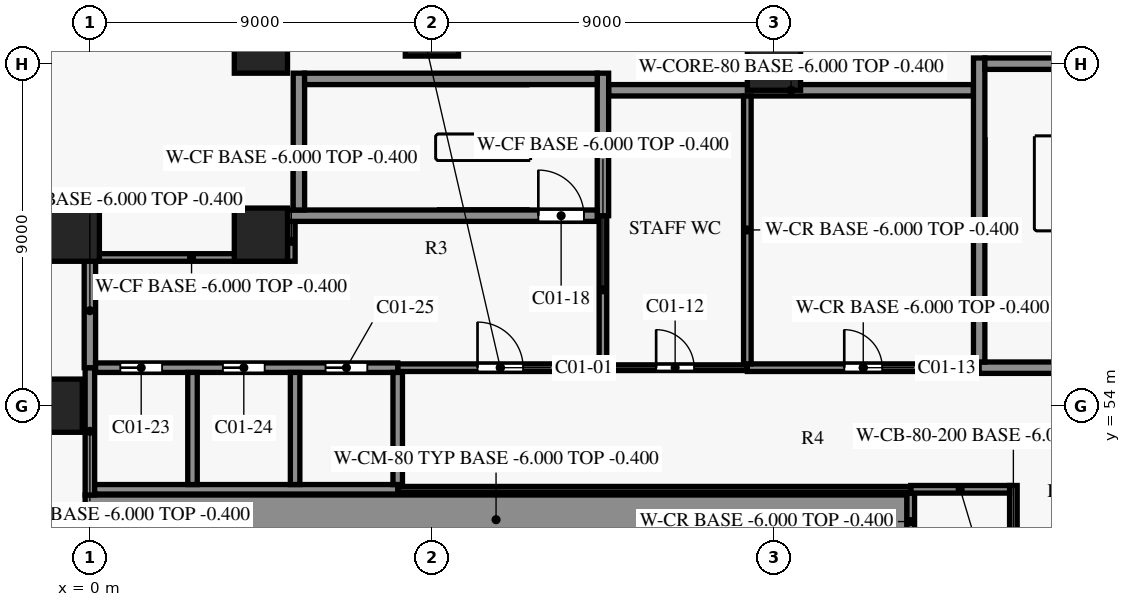
"""IFC4 building model, lengths in metres.
Left out: names, types, materials, properties, quantities, classifications, styles, units other than length and angle.
Written with IfcOpenShell. Run it as: python <this file> out.ifc"""

import sys

from ifc_helpers import new_model, si_unit, direction, frame, frame_2d, origin, origin_2d, place, context, subcontext, project, spatial, rectangle, extrude, element, fill, save


model = new_model("IFC4")
c1 = context("Model", 3, precision=1e-05, world=origin(), true_north=direction((0.0, 1.0)))
c2 = subcontext(c1, "Body", "Model", "MODEL_VIEW")
j1 = project(units=[si_unit("LENGTHUNIT", "METRE"), si_unit("PLANEANGLEUNIT", "RADIAN")], contexts=[c1])
p1 = place(None, origin())
s1 = spatial("IfcSite", under=j1, at=p1, CompositionType="ELEMENT")
p2 = place(p1, origin())
s2 = spatial("IfcBuilding", under=s1, at=p2, CompositionType="ELEMENT")
p3 = place(p2, frame((0.0, 0.0, -6.0)))
s3 = spatial("IfcBuildingStorey", under=s2, at=p3, CompositionType="ELEMENT", Elevation=-6.0)
for number, where, z_axis, x_axis in (
    (1, (18.0, 63.0, 0.0), (0.0, 0.0, 1.0), (1.0, 0.0, 0.0)),
    (2, (9.0, 63.9, 0.0), (0.0, 0.0, 1.0), (1.0, 0.0, 0.0)),
    (3, (4.5, 63.45, 0.0), (0.0, 0.0, 1.0), (1.0, 0.0, 0.0)),
    (4, (-0.45, 58.5, 0.0), (0.0, 0.0, 1.0), (1.0, 0.0, 0.0)),
    (5, (-0.9, 54.0, 0.0), (0.0, 0.0, 1.0), (1.0, 0.0, 0.0)),
    (6, (4.5, 58.5, 0.0), (0.0, 0.0, 1.0), (1.0, 0.0, 0.0)),
):
    element("IfcColumn", number, at=place(p3, frame(where, z_axis=z_axis, x_axis=x_axis)), inside=s3, PredefinedType="COLUMN", context=c2, shape_type="SweptSolid", body=[
        extrude(rectangle(XDim=1.4, YDim=1.4, at=origin_2d()), origin(), (0.0, 0.0, 1.0), 6.0),
    ])
p4 = place(p3, frame((-0.125, 51.0, 0.0), z_axis=(0.0, 0.0, 1.0), x_axis=(1.0, 0.0, 0.0)))
e7 = element("IfcWall", 7, at=p4, inside=s3, PredefinedType="SHEAR", context=c2, shape_type="SweptSolid", body=[
    extrude(rectangle(XDim=21.625, YDim=1.3, at=frame_2d((10.812, 0.0))), origin(), (0.0, 0.0, 1.0), 5.6),
])
p5 = place(p3, frame((8.1, 51.8, 0.0), z_axis=(0.0, 0.0, 1.0), x_axis=(1.0, 0.0, 0.0)))
e8 = element("IfcWall", 8, at=p5, inside=s3, PredefinedType="PARTITIONING", context=c2, shape_type="SweptSolid", body=[
    extrude(rectangle(XDim=13.5, YDim=0.15, at=frame_2d((6.75, 0.0))), origin(), (0.0, 0.0, 1.0), 5.6),
])
p6 = place(p3, frame((21.6, 51.8, 0.0), z_axis=(0.0, 0.0, 1.0), x_axis=(1.0, 0.0, 0.0)))
e9 = element("IfcWall", 9, at=p6, inside=s3, PredefinedType="PARTITIONING", context=c2, shape_type="SweptSolid", body=[
    extrude(rectangle(XDim=2.6, YDim=0.2, at=frame_2d((1.3, 0.0))), origin(), (0.0, 0.0, 1.0), 5.6),
])
p7 = place(p3, frame((0.125, 51.8, 0.0), z_axis=(0.0, 0.0, 1.0), x_axis=(1.0, 0.0, 0.0)))
e10 = element("IfcWall", 10, at=p7, inside=s3, PredefinedType="SHEAR", context=c2, shape_type="SweptSolid", body=[
    extrude(rectangle(XDim=7.975, YDim=0.25, at=frame_2d((3.988, 0.0))), origin(), (0.0, 0.0, 1.0), 5.6),
])
p8 = place(p3, frame((8.1, 55.0, 0.0), z_axis=(0.0, 0.0, 1.0), x_axis=(1.0, 0.0, 0.0)))
e11 = element("IfcWall", 11, at=p8, inside=s3, PredefinedType="PARTITIONING", context=c2, shape_type="SweptSolid", body=[
    extrude(rectangle(XDim=5.4, YDim=0.2, at=frame_2d((2.7, 0.0))), origin(), (0.0, 0.0, 1.0), 5.6),
])
p9 = place(p8, frame((2.1, 0.0, 0.0)))
e12 = element("IfcOpeningElement", 12, at=p9, cuts=e11, PredefinedType="OPENING", context=c2, shape_type="SweptSolid", body=[
    extrude(rectangle(XDim=1.2, YDim=2.2, at=frame_2d((0.6, 1.1))), frame((0.0, 0.11, 0.0), z_axis=(0.0, -1.0, 0.0), x_axis=(1.0, 0.0, 0.0)), (0.0, 0.0, 1.0), 0.22),
])
p10 = place(p3, frame((13.5, 55.0, 0.0), z_axis=(0.0, 0.0, 1.0), x_axis=(1.0, 0.0, 0.0)))
e13 = element("IfcWall", 13, at=p10, inside=s3, PredefinedType="PARTITIONING", context=c2, shape_type="SweptSolid", body=[
    extrude(rectangle(XDim=3.8, YDim=0.15, at=frame_2d((1.9, 0.0))), origin(), (0.0, 0.0, 1.0), 5.6),
])
p11 = place(p10, frame((1.4, 0.0, 0.0)))
e14 = element("IfcOpeningElement", 14, at=p11, cuts=e13, PredefinedType="OPENING", context=c2, shape_type="SweptSolid", body=[
    extrude(rectangle(XDim=1.0, YDim=2.1, at=frame_2d((0.5, 1.05))), frame((0.0, 0.085, 0.0), z_axis=(0.0, -1.0, 0.0), x_axis=(1.0, 0.0, 0.0)), (0.0, 0.0, 1.0), 0.17),
])
p12 = place(p3, frame((17.3, 55.0, 0.0), z_axis=(0.0, 0.0, 1.0), x_axis=(1.0, 0.0, 0.0)))
e15 = element("IfcWall", 15, at=p12, inside=s3, PredefinedType="PARTITIONING", context=c2, shape_type="SweptSolid", body=[
    extrude(rectangle(XDim=6.1, YDim=0.2, at=frame_2d((3.05, 0.0))), origin(), (0.0, 0.0, 1.0), 5.6),
])
p13 = place(p12, frame((2.55, 0.0, 0.0)))
e16 = element("IfcOpeningElement", 16, at=p13, cuts=e15, PredefinedType="OPENING", context=c2, shape_type="SweptSolid", body=[
    extrude(rectangle(XDim=1.0, YDim=2.1, at=frame_2d((0.5, 1.05))), frame((0.0, 0.11, 0.0), z_axis=(0.0, -1.0, 0.0), x_axis=(1.0, 0.0, 0.0)), (0.0, 0.0, 1.0), 0.22),
])
p14 = place(p3, frame((0.15, 55.0, 0.0), z_axis=(0.0, 0.0, 1.0), x_axis=(1.0, 0.0, 0.0)))
e17 = element("IfcWall", 17, at=p14, inside=s3, PredefinedType="SHEAR", context=c2, shape_type="SweptSolid", body=[
    extrude(rectangle(XDim=7.95, YDim=0.25, at=frame_2d((3.975, 0.0))), origin(), (0.0, 0.0, 1.0), 5.6),
])
p15 = place(p14, frame((0.65, 0.0, 0.0)))
e18 = element("IfcOpeningElement", 18, at=p15, cuts=e17, PredefinedType="OPENING", context=c2, shape_type="SweptSolid", body=[
    extrude(rectangle(XDim=1.1, YDim=2.1, at=frame_2d((0.55, 1.05))), frame((0.0, 0.135, 0.0), z_axis=(0.0, -1.0, 0.0), x_axis=(1.0, 0.0, 0.0)), (0.0, 0.0, 1.0), 0.27),
])
p16 = place(p14, frame((3.35, 0.0, 0.0)))
e19 = element("IfcOpeningElement", 19, at=p16, cuts=e17, PredefinedType="OPENING", context=c2, shape_type="SweptSolid", body=[
    extrude(rectangle(XDim=1.1, YDim=2.1, at=frame_2d((0.55, 1.05))), frame((0.0, 0.135, 0.0), z_axis=(0.0, -1.0, 0.0), x_axis=(1.0, 0.0, 0.0)), (0.0, 0.0, 1.0), 0.27),
])
p17 = place(p14, frame((6.05, 0.0, 0.0)))
e20 = element("IfcOpeningElement", 20, at=p17, cuts=e17, PredefinedType="OPENING", context=c2, shape_type="SweptSolid", body=[
    extrude(rectangle(XDim=1.1, YDim=2.1, at=frame_2d((0.55, 1.05))), frame((0.0, 0.135, 0.0), z_axis=(0.0, -1.0, 0.0), x_axis=(1.0, 0.0, 0.0)), (0.0, 0.0, 1.0), 0.27),
])
p18 = place(p3, frame((23.4, 55.0, 0.0), z_axis=(0.0, 0.0, 1.0), x_axis=(1.0, 0.0, 0.0)))
e21 = element("IfcWall", 21, at=p18, inside=s3, PredefinedType="SHEAR", context=c2, shape_type="SweptSolid", body=[
    extrude(rectangle(XDim=3.45, YDim=0.3, at=frame_2d((1.725, 0.0))), origin(), (0.0, 0.0, 1.0), 5.6),
])
p19 = place(p3, frame((0.15, 57.9, 0.0), z_axis=(0.0, 0.0, 1.0), x_axis=(1.0, 0.0, 0.0)))
e22 = element("IfcWall", 22, at=p19, inside=s3, PredefinedType="PARTITIONING", context=c2, shape_type="SweptSolid", body=[
    extrude(rectangle(XDim=5.05, YDim=0.2, at=frame_2d((2.525, 0.0))), origin(), (0.0, 0.0, 1.0), 5.6),
])
p20 = place(p3, frame((5.2, 59.0, 0.0), z_axis=(0.0, 0.0, 1.0), x_axis=(1.0, 0.0, 0.0)))
e23 = element("IfcWall", 23, at=p20, inside=s3, PredefinedType="SHEAR", context=c2, shape_type="SweptSolid", body=[
    extrude(rectangle(XDim=8.15, YDim=0.3, at=frame_2d((4.075, 0.0))), origin(), (0.0, 0.0, 1.0), 5.6),
])
p21 = place(p20, frame((6.6, 0.0, 0.0)))
e24 = element("IfcOpeningElement", 24, at=p21, cuts=e23, PredefinedType="OPENING", context=c2, shape_type="SweptSolid", body=[
    extrude(rectangle(XDim=1.2, YDim=2.2, at=frame_2d((0.6, 1.1))), frame((0.0, 0.16, 0.0), z_axis=(0.0, -1.0, 0.0), x_axis=(1.0, 0.0, 0.0)), (0.0, 0.0, 1.0), 0.32),
])
p22 = place(p3, frame((13.65, 62.3, 0.0), z_axis=(0.0, 0.0, 1.0), x_axis=(1.0, 0.0, 0.0)))
e25 = element("IfcWall", 25, at=p22, inside=s3, PredefinedType="SHEAR", context=c2, shape_type="SweptSolid", body=[
    extrude(rectangle(XDim=9.6, YDim=0.3, at=frame_2d((4.8, 0.0))), origin(), (0.0, 0.0, 1.0), 5.6),
])
p23 = place(p3, frame((5.65, 62.6, 0.0), z_axis=(0.0, 0.0, 1.0), x_axis=(1.0, 0.0, 0.0)))
e26 = element("IfcWall", 26, at=p23, inside=s3, PredefinedType="SHEAR", context=c2, shape_type="SweptSolid", body=[
    extrude(rectangle(XDim=7.7, YDim=0.3, at=frame_2d((3.85, 0.0))), origin(), (0.0, 0.0, 1.0), 5.6),
])
p24 = place(p3, frame((23.55, 63.0, 0.0), z_axis=(0.0, 0.0, 1.0), x_axis=(1.0, 0.0, 0.0)))
e27 = element("IfcWall", 27, at=p24, inside=s3, PredefinedType="SHEAR", context=c2, shape_type="SweptSolid", body=[
    extrude(rectangle(XDim=3.3, YDim=0.3, at=frame_2d((1.65, 0.0))), origin(), (0.0, 0.0, 1.0), 5.6),
])
p25 = place(p3, frame((0.0, 55.0, 0.0), z_axis=(0.0, 0.0, 1.0), x_axis=(0.0, 1.0, 0.0)))
e28 = element("IfcWall", 28, at=p25, inside=s3, PredefinedType="SHEAR", context=c2, shape_type="SweptSolid", body=[
    extrude(rectangle(XDim=3.0, YDim=0.3, at=frame_2d((1.5, 0.0))), origin(), (0.0, 0.0, 1.0), 5.6),
])
p26 = place(p3, frame((0.0, 51.65, 0.0), z_axis=(0.0, 0.0, 1.0), x_axis=(0.0, 1.0, 0.0)))
e29 = element("IfcWall", 29, at=p26, inside=s3, PredefinedType="SHEAR", context=c2, shape_type="SweptSolid", body=[
    extrude(rectangle(XDim=3.35, YDim=0.25, at=frame_2d((1.675, 0.0))), origin(), (0.0, 0.0, 1.0), 5.6),
])
p27 = place(p3, frame((2.7, 51.925, 0.0), z_axis=(0.0, 0.0, 1.0), x_axis=(0.0, 1.0, 0.0)))
e30 = element("IfcWall", 30, at=p27, inside=s3, PredefinedType="SHEAR", context=c2, shape_type="SweptSolid", body=[
    extrude(rectangle(XDim=2.95, YDim=0.25, at=frame_2d((1.475, 0.0))), origin(), (0.0, 0.0, 1.0), 5.6),
])
p28 = place(p3, frame((5.3, 57.8, 0.0), z_axis=(0.0, 0.0, 1.0), x_axis=(0.0, 1.0, 0.0)))
e31 = element("IfcWall", 31, at=p28, inside=s3, PredefinedType="PARTITIONING", context=c2, shape_type="SweptSolid", body=[
    extrude(rectangle(XDim=1.05, YDim=0.2, at=frame_2d((0.525, 0.0))), origin(), (0.0, 0.0, 1.0), 5.6),
])
p29 = place(p3, frame((5.4, 51.925, 0.0), z_axis=(0.0, 0.0, 1.0), x_axis=(0.0, 1.0, 0.0)))
e32 = element("IfcWall", 32, at=p29, inside=s3, PredefinedType="SHEAR", context=c2, shape_type="SweptSolid", body=[
    extrude(rectangle(XDim=2.95, YDim=0.25, at=frame_2d((1.475, 0.0))), origin(), (0.0, 0.0, 1.0), 5.6),
])
p30 = place(p3, frame((5.5, 59.15, 0.0), z_axis=(0.0, 0.0, 1.0), x_axis=(0.0, 1.0, 0.0)))
e33 = element("IfcWall", 33, at=p30, inside=s3, PredefinedType="SHEAR", context=c2, shape_type="SweptSolid", body=[
    extrude(rectangle(XDim=3.6, YDim=0.3, at=frame_2d((1.8, 0.0))), origin(), (0.0, 0.0, 1.0), 5.6),
])
p31 = place(p3, frame((8.1, 51.925, 0.0), z_axis=(0.0, 0.0, 1.0), x_axis=(0.0, 1.0, 0.0)))
e34 = element("IfcWall", 34, at=p31, inside=s3, PredefinedType="SHEAR", context=c2, shape_type="SweptSolid", body=[
    extrude(rectangle(XDim=2.95, YDim=0.25, at=frame_2d((1.475, 0.0))), origin(), (0.0, 0.0, 1.0), 5.6),
])
p32 = place(p3, frame((13.5, 55.1, 0.0), z_axis=(0.0, 0.0, 1.0), x_axis=(0.0, 1.0, 0.0)))
e35 = element("IfcWall", 35, at=p32, inside=s3, PredefinedType="PARTITIONING", context=c2, shape_type="SweptSolid", body=[
    extrude(rectangle(XDim=3.9, YDim=0.2, at=frame_2d((1.95, 0.0))), origin(), (0.0, 0.0, 1.0), 5.6),
])
p33 = place(p3, frame((13.5, 59.0, 0.0), z_axis=(0.0, 0.0, 1.0), x_axis=(0.0, 1.0, 0.0)))
e36 = element("IfcWall", 36, at=p33, inside=s3, PredefinedType="SHEAR", context=c2, shape_type="SweptSolid", body=[
    extrude(rectangle(XDim=3.75, YDim=0.3, at=frame_2d((1.875, 0.0))), origin(), (0.0, 0.0, 1.0), 5.6),
])
p34 = place(p3, frame((17.3, 55.1, 0.0), z_axis=(0.0, 0.0, 1.0), x_axis=(0.0, 1.0, 0.0)))
e37 = element("IfcWall", 37, at=p34, inside=s3, PredefinedType="PARTITIONING", context=c2, shape_type="SweptSolid", body=[
    extrude(rectangle(XDim=7.05, YDim=0.2, at=frame_2d((3.525, 0.0))), origin(), (0.0, 0.0, 1.0), 5.6),
])
p35 = place(p3, frame((21.6, 50.2, 0.0), z_axis=(0.0, 0.0, 1.0), x_axis=(0.0, 1.0, 0.0)))
e38 = element("IfcWall", 38, at=p35, inside=s3, PredefinedType="PARTITIONING", context=c2, shape_type="SweptSolid", body=[
    extrude(rectangle(XDim=1.5, YDim=0.2, at=frame_2d((0.75, 0.0))), origin(), (0.0, 0.0, 1.0), 5.6),
])
p36 = place(p3, frame((23.4, 55.15, 0.0), z_axis=(0.0, 0.0, 1.0), x_axis=(0.0, 1.0, 0.0)))
e39 = element("IfcWall", 39, at=p36, inside=s3, PredefinedType="SHEAR", context=c2, shape_type="SweptSolid", body=[
    extrude(rectangle(XDim=8.0, YDim=0.3, at=frame_2d((4.0, 0.0))), origin(), (0.0, 0.0, 1.0), 5.6),
])
p37 = place(p3, frame((24.3, 46.9, 0.0), z_axis=(0.0, 0.0, 1.0), x_axis=(0.0, 1.0, 0.0)))
e40 = element("IfcWall", 40, at=p37, inside=s3, PredefinedType="SHEAR", context=c2, shape_type="SweptSolid", body=[
    extrude(rectangle(XDim=5.0, YDim=0.2, at=frame_2d((2.5, 0.0))), origin(), (0.0, 0.0, 1.0), 5.6),
])
p38 = place(p9, origin())
e41 = element("IfcDoor", 41, at=p38, inside=s3, OperationType="SINGLE_SWING_RIGHT", PredefinedType="DOOR", context=c2, shape_type="SweptSolid", body=[
    extrude(rectangle(XDim=1.2, YDim=2.2, at=frame_2d((0.6, 1.1))), frame((0.0, 0.025, 0.0), z_axis=(0.0, -1.0, 0.0), x_axis=(1.0, 0.0, 0.0)), (0.0, 0.0, 1.0), 0.05),
])
fill(e12, e41)
p39 = place(p11, origin())
e42 = element("IfcDoor", 42, at=p39, inside=s3, OperationType="SINGLE_SWING_LEFT", PredefinedType="DOOR", context=c2, shape_type="SweptSolid", body=[
    extrude(rectangle(XDim=1.0, YDim=2.1, at=frame_2d((0.5, 1.05))), frame((0.0, 0.025, 0.0), z_axis=(0.0, -1.0, 0.0), x_axis=(1.0, 0.0, 0.0)), (0.0, 0.0, 1.0), 0.05),
])
fill(e14, e42)
p40 = place(p13, origin())
e43 = element("IfcDoor", 43, at=p40, inside=s3, OperationType="SINGLE_SWING_RIGHT", PredefinedType="DOOR", context=c2, shape_type="SweptSolid", body=[
    extrude(rectangle(XDim=1.0, YDim=2.1, at=frame_2d((0.5, 1.05))), frame((0.0, 0.025, 0.0), z_axis=(0.0, -1.0, 0.0), x_axis=(1.0, 0.0, 0.0)), (0.0, 0.0, 1.0), 0.05),
])
fill(e16, e43)
p41 = place(p21, origin())
e44 = element("IfcDoor", 44, at=p41, inside=s3, OperationType="SINGLE_SWING_RIGHT", PredefinedType="DOOR", context=c2, shape_type="SweptSolid", body=[
    extrude(rectangle(XDim=1.2, YDim=2.2, at=frame_2d((0.6, 1.1))), frame((0.0, 0.025, 0.0), z_axis=(0.0, -1.0, 0.0), x_axis=(1.0, 0.0, 0.0)), (0.0, 0.0, 1.0), 0.05),
])
fill(e24, e44)
p42 = place(p15, origin())
e45 = element("IfcDoor", 45, at=p42, inside=s3, OperationType="DOUBLE_DOOR_SLIDING", PredefinedType="DOOR", context=c2, shape_type="SweptSolid", body=[
    extrude(rectangle(XDim=1.1, YDim=2.1, at=frame_2d((0.55, 1.05))), frame((0.0, 0.025, 0.0), z_axis=(0.0, -1.0, 0.0), x_axis=(1.0, 0.0, 0.0)), (0.0, 0.0, 1.0), 0.05),
])
fill(e18, e45)
p43 = place(p16, origin())
e46 = element("IfcDoor", 46, at=p43, inside=s3, OperationType="DOUBLE_DOOR_SLIDING", PredefinedType="DOOR", context=c2, shape_type="SweptSolid", body=[
    extrude(rectangle(XDim=1.1, YDim=2.1, at=frame_2d((0.55, 1.05))), frame((0.0, 0.025, 0.0), z_axis=(0.0, -1.0, 0.0), x_axis=(1.0, 0.0, 0.0)), (0.0, 0.0, 1.0), 0.05),
])
fill(e19, e46)
p44 = place(p17, origin())
e47 = element("IfcDoor", 47, at=p44, inside=s3, OperationType="DOUBLE_DOOR_SLIDING", PredefinedType="DOOR", context=c2, shape_type="SweptSolid", body=[
    extrude(rectangle(XDim=1.1, YDim=2.1, at=frame_2d((0.55, 1.05))), frame((0.0, 0.025, 0.0), z_axis=(0.0, -1.0, 0.0), x_axis=(1.0, 0.0, 0.0)), (0.0, 0.0, 1.0), 0.05),
])
fill(e20, e47)
save(model, sys.argv[1])
